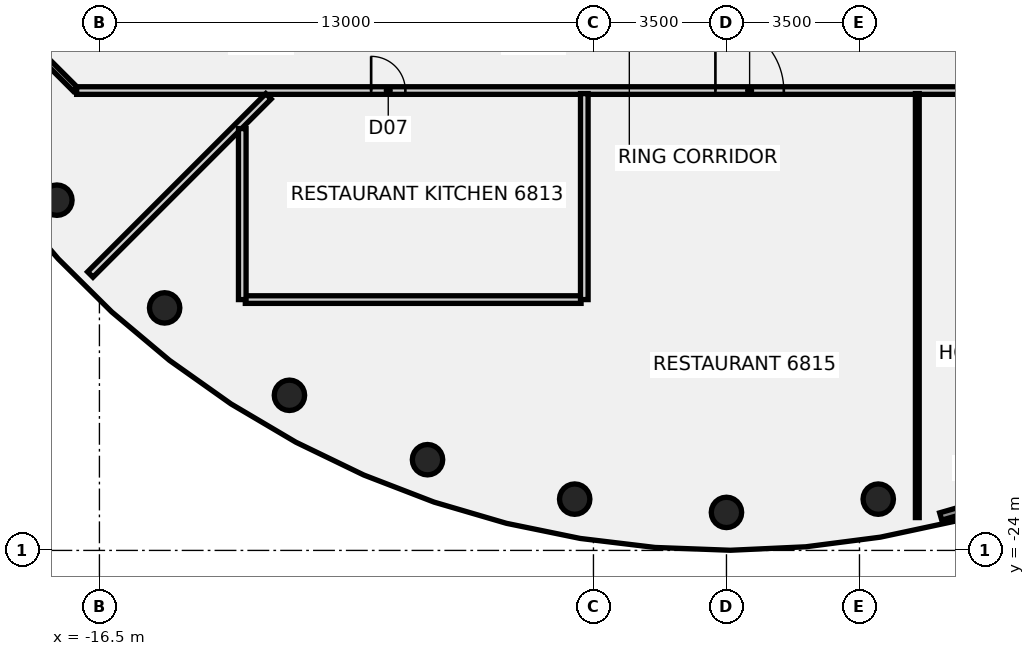
"""IFC4 building model, lengths in metres.
Left out: names, types, materials, properties, quantities, classifications, styles, units other than length and angle.
Written with IfcOpenShell. Run it as: python <this file> out.ifc"""

import sys

from ifc_helpers import new_model, si_unit, direction, frame, frame_2d, origin, origin_2d, place, context, subcontext, project, spatial, rectangle, circle, extrude, element, fill, save


model = new_model("IFC4")
c1 = context("Model", 3, precision=1e-05, world=origin(), true_north=direction((0.0, 1.0)))
c2 = subcontext(c1, "Body", "Model", "MODEL_VIEW")
j1 = project(units=[si_unit("LENGTHUNIT", "METRE"), si_unit("PLANEANGLEUNIT", "RADIAN")], contexts=[c1])
p1 = place(None, origin())
s1 = spatial("IfcSite", under=j1, at=p1, CompositionType="ELEMENT")
p2 = place(p1, origin())
s2 = spatial("IfcBuilding", under=s1, at=p2, CompositionType="ELEMENT")
p3 = place(p2, frame((0.0, 0.0, 267.6)))
s3 = spatial("IfcBuildingStorey", under=s2, at=p3, CompositionType="ELEMENT", Elevation=267.6)
for number, where, z_axis, x_axis in (
    (1, (-17.619, -14.784, -0.14), (0.0, 0.0, 1.0), (1.0, 0.0, 0.0)),
    (2, (-14.784, -17.619, -0.14), (0.0, 0.0, 1.0), (1.0, 0.0, 0.0)),
    (3, (-11.5, -19.919, -0.14), (0.0, 0.0, 1.0), (1.0, 0.0, 0.0)),
    (4, (-7.866, -21.613, -0.14), (0.0, 0.0, 1.0), (1.0, 0.0, 0.0)),
    (5, (-3.994, -22.651, -0.14), (0.0, 0.0, 1.0), (1.0, 0.0, 0.0)),
    (6, (0.0, -23.0, -0.14), (0.0, 0.0, 1.0), (1.0, 0.0, 0.0)),
    (7, (3.994, -22.651, -0.14), (0.0, 0.0, 1.0), (1.0, 0.0, 0.0)),
):
    element("IfcColumn", number, at=place(p3, frame(where, z_axis=z_axis, x_axis=x_axis)), inside=s3, PredefinedType="COLUMN", context=c2, shape_type="SweptSolid", body=[
        extrude(circle(Radius=0.4, at=origin_2d()), origin(), (0.0, 0.0, 1.0), 3.6),
    ])
p4 = place(p3, frame((-18.872, -10.128, 0.0), z_axis=(0.0, 0.0, 1.0), x_axis=(0.707106781187, -0.707106781187, 0.0)))
e8 = element("IfcWall", 8, at=p4, inside=s3, PredefinedType="PARTITIONING", context=c2, shape_type="SweptSolid", body=[
    extrude(rectangle(XDim=2.455, YDim=0.15, at=frame_2d((1.228, 0.0))), origin(), (0.0, 0.0, 1.0), 2.864),
])
p5 = place(p3, frame((-17.1, -11.9, 0.0), z_axis=(0.0, 0.0, 1.0), x_axis=(1.0, 0.0, 0.0)))
e9 = element("IfcWall", 9, at=p5, inside=s3, PredefinedType="PARTITIONING", context=c2, shape_type="SweptSolid", body=[
    extrude(rectangle(XDim=34.165, YDim=0.2, at=frame_2d((17.083, 0.0))), origin(), (0.0, 0.0, 1.0), 2.864),
])
p6 = place(p5, frame((7.75, 0.0, 0.0)))
e10 = element("IfcOpeningElement", 10, at=p6, cuts=e9, PredefinedType="OPENING", context=c2, shape_type="SweptSolid", body=[
    extrude(rectangle(XDim=0.9, YDim=2.1, at=frame_2d((0.45, 1.05))), frame((0.0, 0.11, 0.0), z_axis=(0.0, -1.0, 0.0), x_axis=(1.0, 0.0, 0.0)), (0.0, 0.0, 1.0), 0.22),
])
p7 = place(p5, frame((27.541, 0.0, 0.0)))
e11 = element("IfcOpeningElement", 11, at=p7, cuts=e9, PredefinedType="OPENING", context=c2, shape_type="SweptSolid", body=[
    extrude(rectangle(XDim=0.9, YDim=2.1, at=frame_2d((0.45, 1.05))), frame((0.0, 0.11, 0.0), z_axis=(0.0, -1.0, 0.0), x_axis=(1.0, 0.0, 0.0)), (0.0, 0.0, 1.0), 0.22),
])
p8 = place(p5, frame((16.809, 0.0, 0.0)))
e12 = element("IfcOpeningElement", 12, at=p8, cuts=e9, PredefinedType="OPENING", context=c2, shape_type="SweptSolid", body=[
    extrude(rectangle(XDim=1.8, YDim=2.1, at=frame_2d((0.9, 1.05))), frame((0.0, 0.11, 0.0), z_axis=(0.0, -1.0, 0.0), x_axis=(1.0, 0.0, 0.0)), (0.0, 0.0, 1.0), 0.22),
])
p9 = place(p5, frame((24.222, 0.0, 0.0)))
e13 = element("IfcOpeningElement", 13, at=p9, cuts=e9, PredefinedType="OPENING", context=c2, shape_type="SweptSolid", body=[
    extrude(rectangle(XDim=0.9, YDim=2.1, at=frame_2d((0.45, 1.05))), frame((0.0, 0.11, 0.0), z_axis=(0.0, -1.0, 0.0), x_axis=(1.0, 0.0, 0.0)), (0.0, 0.0, 1.0), 0.22),
])
p10 = place(p5, frame((31.7, 0.0, 0.0)))
e14 = element("IfcOpeningElement", 14, at=p10, cuts=e9, PredefinedType="OPENING", context=c2, shape_type="SweptSolid", body=[
    extrude(rectangle(XDim=0.9, YDim=2.1, at=frame_2d((0.45, 1.05))), frame((0.0, 0.11, 0.0), z_axis=(0.0, -1.0, 0.0), x_axis=(1.0, 0.0, 0.0)), (0.0, 0.0, 1.0), 0.22),
])
p11 = place(p3, frame((-12.661, -17.4, 0.0), z_axis=(0.0, 0.0, 1.0), x_axis=(1.0, 0.0, 0.0)))
e15 = element("IfcWall", 15, at=p11, inside=s3, PredefinedType="PARTITIONING", context=c2, shape_type="SweptSolid", body=[
    extrude(rectangle(XDim=8.835, YDim=0.2, at=frame_2d((4.417, 0.0))), origin(), (0.0, 0.0, 1.0), 2.864),
])
p12 = place(p3, frame((-16.74, -16.74, 0.0), z_axis=(0.0, 0.0, 1.0), x_axis=(0.707106781187, 0.707106781187, 0.0)))
e16 = element("IfcWall", 16, at=p12, inside=s3, PredefinedType="PARTITIONING", context=c2, shape_type="SweptSolid", body=[
    extrude(rectangle(XDim=6.631, YDim=0.2, at=frame_2d((3.315, 0.0))), origin(), (0.0, 0.0, 1.0), 2.864),
])
p13 = place(p3, frame((-12.741, -17.4, 0.0), z_axis=(0.0, 0.0, 1.0), x_axis=(0.0, 1.0, 0.0)))
e17 = element("IfcWall", 17, at=p13, inside=s3, PredefinedType="PARTITIONING", context=c2, shape_type="SweptSolid", body=[
    extrude(rectangle(XDim=4.499, YDim=0.2, at=frame_2d((2.25, 0.0))), origin(), (0.0, 0.0, 1.0), 2.864),
])
p14 = place(p3, frame((-3.741, -17.4, 0.0), z_axis=(0.0, 0.0, 1.0), x_axis=(0.0, 1.0, 0.0)))
e18 = element("IfcWall", 18, at=p14, inside=s3, PredefinedType="PARTITIONING", context=c2, shape_type="SweptSolid", body=[
    extrude(rectangle(XDim=5.42, YDim=0.2, at=frame_2d((2.71, 0.0))), origin(), (0.0, 0.0, 1.0), 2.864),
])
p15 = place(p3, frame((5.022, -23.136, 0.0), z_axis=(0.0, 0.0, 1.0), x_axis=(0.0, 1.0, 0.0)))
e19 = element("IfcWall", 19, at=p15, inside=s3, PredefinedType="PARTITIONING", context=c2, shape_type="SweptSolid", body=[
    extrude(rectangle(XDim=11.156, YDim=0.1, at=frame_2d((5.578, 0.0))), origin(), (0.0, 0.0, 1.0), 2.864),
])
p16 = place(p3, frame((5.638, -23.107, 0.0), z_axis=(0.0, 0.0, 1.0), x_axis=(0.960848925483, 0.277072810644, 0.0)))
e20 = element("IfcWall", 20, at=p16, inside=s3, PredefinedType="SOLIDWALL", context=c2, shape_type="SweptSolid", body=[
    extrude(rectangle(XDim=1.974, YDim=0.2, at=frame_2d((0.987, 0.0))), origin(), (0.0, 0.0, 1.0), 3.46),
])
p17 = place(p6, frame((0.9, 0.0, 0.0), z_axis=(0.0, 0.0, 1.0), x_axis=(-1.0, 0.0, 0.0)))
e21 = element("IfcDoor", 21, at=p17, inside=s3, OperationType="SINGLE_SWING_LEFT", PredefinedType="DOOR", context=c2, shape_type="SweptSolid", body=[
    extrude(rectangle(XDim=0.9, YDim=2.1, at=frame_2d((0.45, 1.05))), frame((0.0, 0.025, 0.0), z_axis=(0.0, -1.0, 0.0), x_axis=(1.0, 0.0, 0.0)), (0.0, 0.0, 1.0), 0.05),
])
fill(e10, e21)
p18 = place(p8, origin())
e22 = element("IfcDoor", 22, at=p18, inside=s3, OperationType="DOUBLE_DOOR_SINGLE_SWING", PredefinedType="DOOR", context=c2, shape_type="SweptSolid", body=[
    extrude(rectangle(XDim=1.8, YDim=2.1, at=frame_2d((0.9, 1.05))), frame((0.0, 0.025, 0.0), z_axis=(0.0, -1.0, 0.0), x_axis=(1.0, 0.0, 0.0)), (0.0, 0.0, 1.0), 0.05),
])
fill(e12, e22)
save(model, sys.argv[1])
